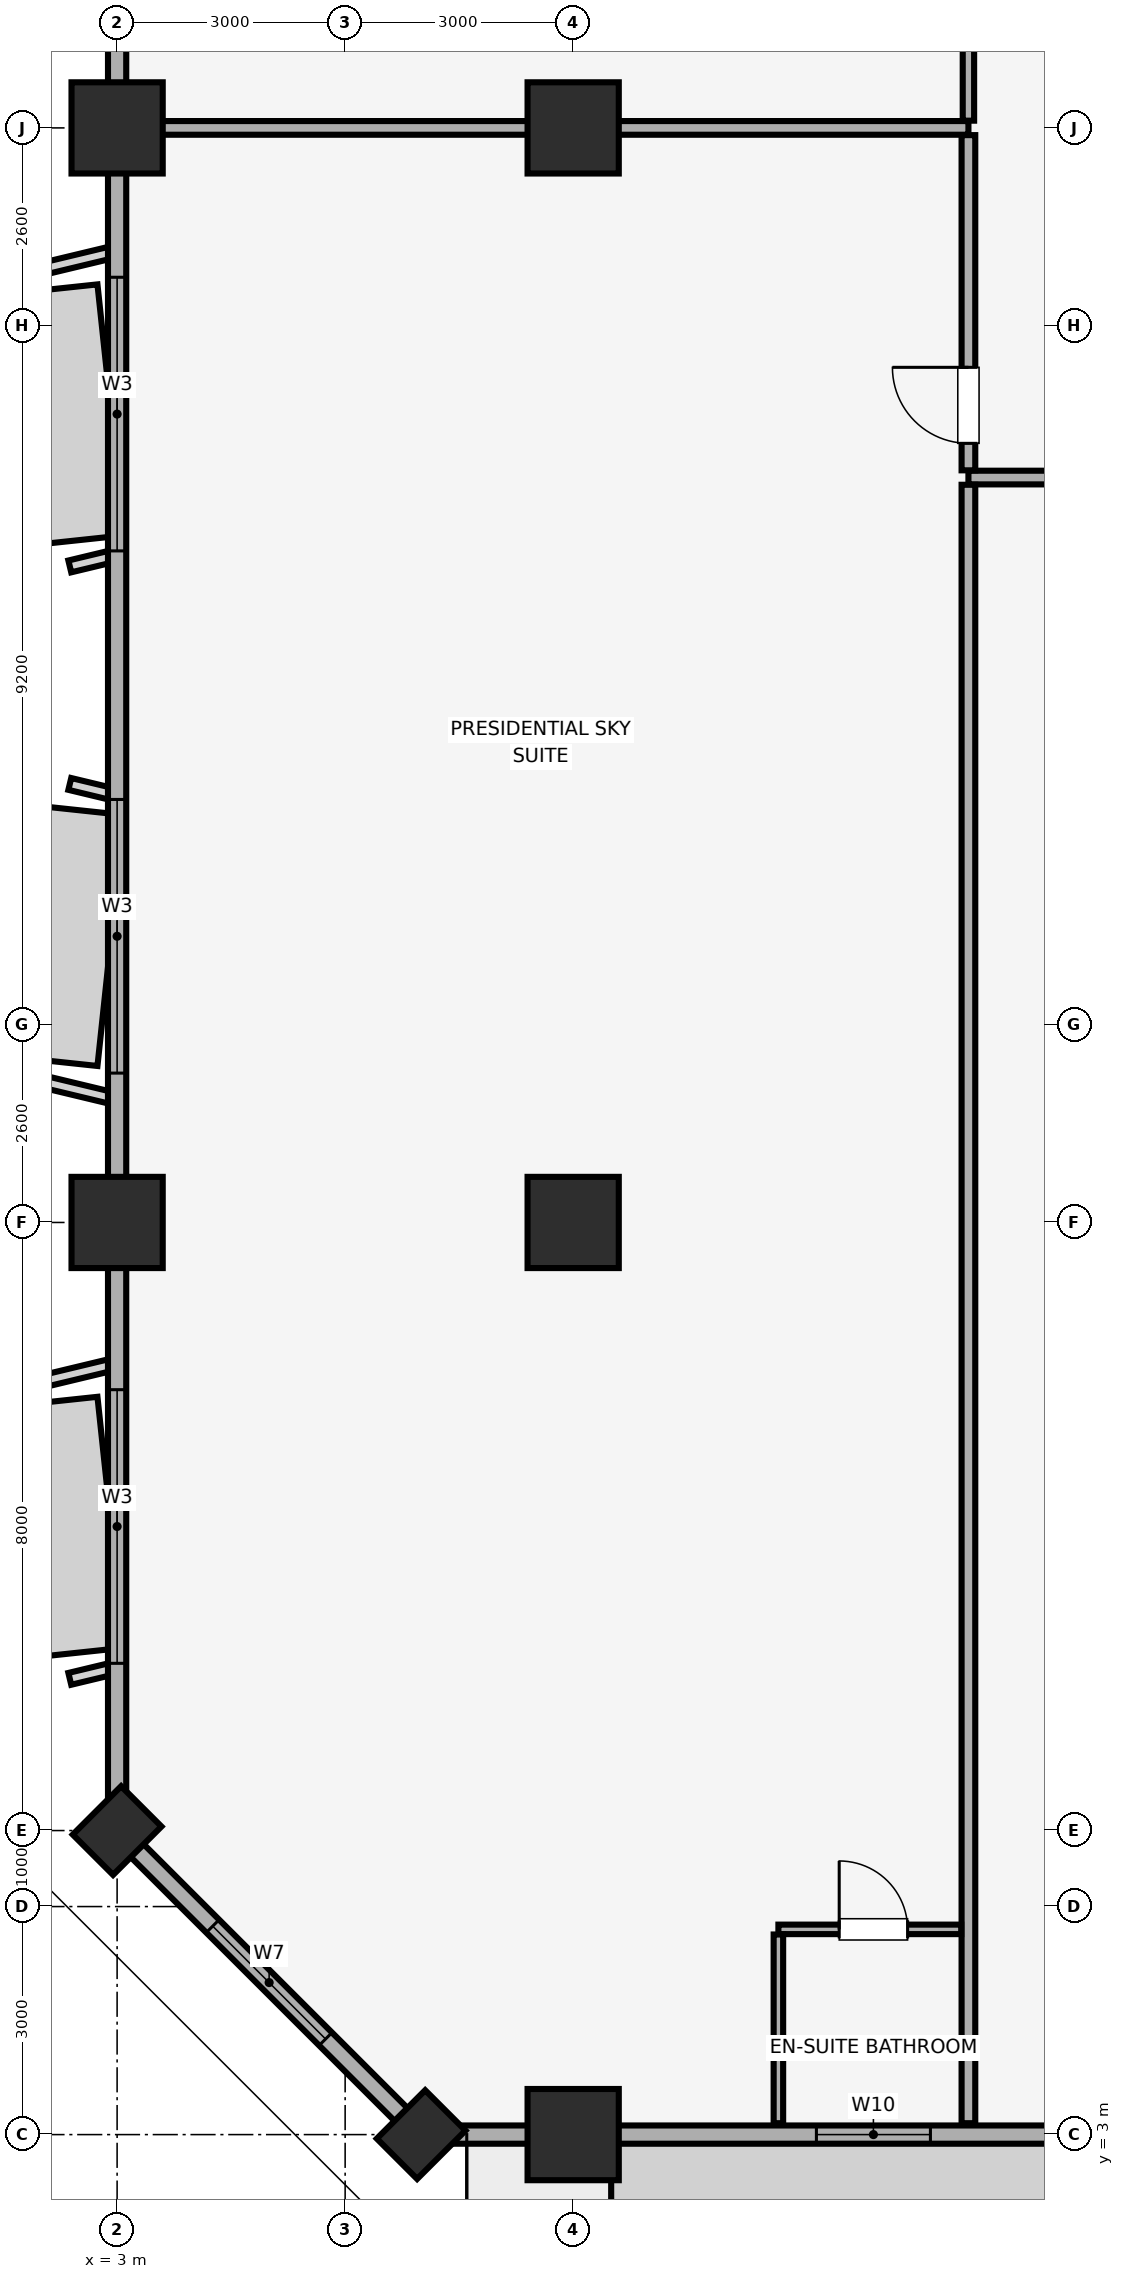
"""IFC4 building model, lengths in metres.
Left out: names, types, materials, properties, quantities, classifications, styles, units other than length and angle.
Written with IfcOpenShell. Run it as: python <this file> out.ifc"""

import sys

from ifc_helpers import new_model, si_unit, direction, frame, frame_2d, origin, origin_2d, place, context, subcontext, project, spatial, rectangle, extrude, element, fill, save


model = new_model("IFC4")
c1 = context("Model", 3, precision=1e-05, world=origin(), true_north=direction((0.0, 1.0)))
c2 = subcontext(c1, "Body", "Model", "MODEL_VIEW")
j1 = project(units=[si_unit("LENGTHUNIT", "METRE"), si_unit("PLANEANGLEUNIT", "RADIAN")], contexts=[c1])
p1 = place(None, origin())
s1 = spatial("IfcSite", under=j1, at=p1, CompositionType="ELEMENT")
p2 = place(p1, origin())
s2 = spatial("IfcBuilding", under=s1, at=p2, CompositionType="ELEMENT")
p3 = place(p2, frame((0.0, 0.0, 220.55)))
s3 = spatial("IfcBuildingStorey", under=s2, at=p3, CompositionType="ELEMENT", Elevation=220.55)
for number, where, z_axis, x_axis in (
    (1, (9.0, 3.0, 0.0), (0.0, 0.0, 1.0), (1.0, 0.0, 0.0)),
    (2, (3.0, 15.0, 0.0), (0.0, 0.0, 1.0), (1.0, 0.0, 0.0)),
    (3, (3.0, 29.4, 0.0), (0.0, 0.0, 1.0), (1.0, 0.0, 0.0)),
):
    element("IfcColumn", number, at=place(p3, frame(where, z_axis=z_axis, x_axis=x_axis)), inside=s3, PredefinedType="COLUMN", context=c2, shape_type="SweptSolid", body=[
        extrude(rectangle(XDim=1.2, YDim=1.2, at=origin_2d()), origin(), (0.0, 0.0, 1.0), 3.56),
    ])
for number, where, z_axis, x_axis in (
    (4, (7.0, 3.0, 0.0), (0.0, 0.0, 1.0), (0.707, 0.707, 0.0)),
    (5, (3.0, 7.0, 0.0), (0.0, 0.0, 1.0), (0.707, 0.707, 0.0)),
):
    element("IfcColumn", number, at=place(p3, frame(where, z_axis=z_axis, x_axis=x_axis)), inside=s3, PredefinedType="PILASTER", context=c2, shape_type="SweptSolid", body=[
        extrude(rectangle(XDim=0.9, YDim=0.75, at=origin_2d()), origin(), (0.0, 0.0, 1.0), 3.56),
    ])
for number, where, z_axis, x_axis in (
    (6, (9.0, 15.0, 0.0), (0.0, 0.0, 1.0), (1.0, 0.0, 0.0)),
    (7, (9.0, 29.4, 0.0), (0.0, 0.0, 1.0), (1.0, 0.0, 0.0)),
):
    element("IfcColumn", number, at=place(p3, frame(where, z_axis=z_axis, x_axis=x_axis)), inside=s3, PredefinedType="COLUMN", context=c2, shape_type="SweptSolid", body=[
        extrude(rectangle(XDim=1.2, YDim=1.2, at=origin_2d()), origin(), (0.0, 0.0, 1.0), 3.56),
    ])
p4 = place(p3, frame((7.0, 3.0, 0.0), z_axis=(0.0, 0.0, 1.0), x_axis=(1.0, 0.0, 0.0)))
e8 = element("IfcWall", 8, at=p4, inside=s3, PredefinedType="SOLIDWALL", context=c2, shape_type="SweptSolid", body=[
    extrude(rectangle(XDim=70.0, YDim=0.24, at=frame_2d((35.0, 0.0))), origin(), (0.0, 0.0, 1.0), 2.76),
])
p5 = place(p4, frame((17.86, 0.0, 0.0)))
e9 = element("IfcOpeningElement", 9, at=p5, cuts=e8, PredefinedType="OPENING", context=c2, shape_type="SweptSolid", body=[
    extrude(rectangle(XDim=1.1, YDim=2.15, at=frame_2d((0.55, 1.075))), frame((0.0, 0.13, 0.0), z_axis=(0.0, -1.0, 0.0), x_axis=(1.0, 0.0, 0.0)), (0.0, 0.0, 1.0), 0.26),
])
p6 = place(p4, frame((26.317, 0.0, 0.0)))
e10 = element("IfcOpeningElement", 10, at=p6, cuts=e8, PredefinedType="OPENING", context=c2, shape_type="SweptSolid", body=[
    extrude(rectangle(XDim=1.1, YDim=2.15, at=frame_2d((0.55, 1.075))), frame((0.0, 0.13, 0.0), z_axis=(0.0, -1.0, 0.0), x_axis=(1.0, 0.0, 0.0)), (0.0, 0.0, 1.0), 0.26),
])
p7 = place(p4, frame((57.517, 0.0, 0.0)))
e11 = element("IfcOpeningElement", 11, at=p7, cuts=e8, PredefinedType="OPENING", context=c2, shape_type="SweptSolid", body=[
    extrude(rectangle(XDim=1.1, YDim=2.15, at=frame_2d((0.55, 1.075))), frame((0.0, 0.13, 0.0), z_axis=(0.0, -1.0, 0.0), x_axis=(1.0, 0.0, 0.0)), (0.0, 0.0, 1.0), 0.26),
])
p8 = place(p4, frame((5.2, 0.0, 0.85)))
e12 = element("IfcOpeningElement", 12, at=p8, cuts=e8, PredefinedType="OPENING", context=c2, shape_type="SweptSolid", body=[
    extrude(rectangle(XDim=1.5, YDim=1.4, at=frame_2d((0.75, 0.7))), frame((0.0, 0.13, 0.0), z_axis=(0.0, -1.0, 0.0), x_axis=(1.0, 0.0, 0.0)), (0.0, 0.0, 1.0), 0.26),
])
p9 = place(p4, frame((10.7, 0.0, 0.85)))
e13 = element("IfcOpeningElement", 13, at=p9, cuts=e8, PredefinedType="OPENING", context=c2, shape_type="SweptSolid", body=[
    extrude(rectangle(XDim=4.2, YDim=1.65, at=frame_2d((2.1, 0.825))), frame((0.0, 0.13, 0.0), z_axis=(0.0, -1.0, 0.0), x_axis=(1.0, 0.0, 0.0)), (0.0, 0.0, 1.0), 0.26),
])
p10 = place(p4, frame((28.243, 0.0, 0.85)))
e14 = element("IfcOpeningElement", 14, at=p10, cuts=e8, PredefinedType="OPENING", context=c2, shape_type="SweptSolid", body=[
    extrude(rectangle(XDim=1.5, YDim=1.4, at=frame_2d((0.75, 0.7))), frame((0.0, 0.13, 0.0), z_axis=(0.0, -1.0, 0.0), x_axis=(1.0, 0.0, 0.0)), (0.0, 0.0, 1.0), 0.26),
])
p11 = place(p4, frame((31.9, 0.0, 0.85)))
e15 = element("IfcOpeningElement", 15, at=p11, cuts=e8, PredefinedType="OPENING", context=c2, shape_type="SweptSolid", body=[
    extrude(rectangle(XDim=2.4, YDim=1.5, at=frame_2d((1.2, 0.75))), frame((0.0, 0.13, 0.0), z_axis=(0.0, -1.0, 0.0), x_axis=(1.0, 0.0, 0.0)), (0.0, 0.0, 1.0), 0.26),
])
p12 = place(p4, frame((35.7, 0.0, 0.85)))
e16 = element("IfcOpeningElement", 16, at=p12, cuts=e8, PredefinedType="OPENING", context=c2, shape_type="SweptSolid", body=[
    extrude(rectangle(XDim=2.4, YDim=1.5, at=frame_2d((1.2, 0.75))), frame((0.0, 0.13, 0.0), z_axis=(0.0, -1.0, 0.0), x_axis=(1.0, 0.0, 0.0)), (0.0, 0.0, 1.0), 0.26),
])
p13 = place(p4, frame((40.7, 0.0, 0.85)))
e17 = element("IfcOpeningElement", 17, at=p13, cuts=e8, PredefinedType="OPENING", context=c2, shape_type="SweptSolid", body=[
    extrude(rectangle(XDim=4.2, YDim=1.65, at=frame_2d((2.1, 0.825))), frame((0.0, 0.13, 0.0), z_axis=(0.0, -1.0, 0.0), x_axis=(1.0, 0.0, 0.0)), (0.0, 0.0, 1.0), 0.26),
])
p14 = place(p4, frame((49.85, 0.0, 0.85)))
e18 = element("IfcOpeningElement", 18, at=p14, cuts=e8, PredefinedType="OPENING", context=c2, shape_type="SweptSolid", body=[
    extrude(rectangle(XDim=2.4, YDim=1.5, at=frame_2d((1.2, 0.75))), frame((0.0, 0.13, 0.0), z_axis=(0.0, -1.0, 0.0), x_axis=(1.0, 0.0, 0.0)), (0.0, 0.0, 1.0), 0.26),
])
p15 = place(p4, frame((54.473, 0.0, 0.85)))
e19 = element("IfcOpeningElement", 19, at=p15, cuts=e8, PredefinedType="OPENING", context=c2, shape_type="SweptSolid", body=[
    extrude(rectangle(XDim=2.4, YDim=1.5, at=frame_2d((1.2, 0.75))), frame((0.0, 0.13, 0.0), z_axis=(0.0, -1.0, 0.0), x_axis=(1.0, 0.0, 0.0)), (0.0, 0.0, 1.0), 0.26),
])
p16 = place(p4, frame((63.3, 0.0, 0.85)))
e20 = element("IfcOpeningElement", 20, at=p16, cuts=e8, PredefinedType="OPENING", context=c2, shape_type="SweptSolid", body=[
    extrude(rectangle(XDim=1.5, YDim=1.4, at=frame_2d((0.75, 0.7))), frame((0.0, 0.13, 0.0), z_axis=(0.0, -1.0, 0.0), x_axis=(1.0, 0.0, 0.0)), (0.0, 0.0, 1.0), 0.26),
])
p17 = place(p3, frame((3.0, 45.0, 0.0), z_axis=(0.0, 0.0, 1.0), x_axis=(0.0, -1.0, 0.0)))
e21 = element("IfcWall", 21, at=p17, inside=s3, PredefinedType="SOLIDWALL", context=c2, shape_type="SweptSolid", body=[
    extrude(rectangle(XDim=38.0, YDim=0.24, at=frame_2d((19.0, 0.0))), origin(), (0.0, 0.0, 1.0), 2.76),
])
p18 = place(p17, frame((32.2, 0.0, 0.85)))
e22 = element("IfcOpeningElement", 22, at=p18, cuts=e21, PredefinedType="OPENING", context=c2, shape_type="SweptSolid", body=[
    extrude(rectangle(XDim=3.6, YDim=1.65, at=frame_2d((1.8, 0.825))), frame((0.0, 0.13, 0.0), z_axis=(0.0, -1.0, 0.0), x_axis=(1.0, 0.0, 0.0)), (0.0, 0.0, 1.0), 0.26),
])
p19 = place(p17, frame((24.435, 0.0, 0.85)))
e23 = element("IfcOpeningElement", 23, at=p19, cuts=e21, PredefinedType="OPENING", context=c2, shape_type="SweptSolid", body=[
    extrude(rectangle(XDim=3.6, YDim=1.65, at=frame_2d((1.8, 0.825))), frame((0.0, 0.13, 0.0), z_axis=(0.0, -1.0, 0.0), x_axis=(1.0, 0.0, 0.0)), (0.0, 0.0, 1.0), 0.26),
])
p20 = place(p17, frame((17.565, 0.0, 0.85)))
e24 = element("IfcOpeningElement", 24, at=p20, cuts=e21, PredefinedType="OPENING", context=c2, shape_type="SweptSolid", body=[
    extrude(rectangle(XDim=3.6, YDim=1.65, at=frame_2d((1.8, 0.825))), frame((0.0, 0.13, 0.0), z_axis=(0.0, -1.0, 0.0), x_axis=(1.0, 0.0, 0.0)), (0.0, 0.0, 1.0), 0.26),
])
p21 = place(p17, frame((10.2, 0.0, 0.85)))
e25 = element("IfcOpeningElement", 25, at=p21, cuts=e21, PredefinedType="OPENING", context=c2, shape_type="SweptSolid", body=[
    extrude(rectangle(XDim=3.6, YDim=1.65, at=frame_2d((1.8, 0.825))), frame((0.0, 0.13, 0.0), z_axis=(0.0, -1.0, 0.0), x_axis=(1.0, 0.0, 0.0)), (0.0, 0.0, 1.0), 0.26),
])
p22 = place(p17, frame((6.55, 0.0, 0.85)))
e26 = element("IfcOpeningElement", 26, at=p22, cuts=e21, PredefinedType="OPENING", context=c2, shape_type="SweptSolid", body=[
    extrude(rectangle(XDim=1.5, YDim=1.4, at=frame_2d((0.75, 0.7))), frame((0.0, 0.13, 0.0), z_axis=(0.0, -1.0, 0.0), x_axis=(1.0, 0.0, 0.0)), (0.0, 0.0, 1.0), 0.26),
])
p23 = place(p17, frame((1.085, 0.0, 0.85)))
e27 = element("IfcOpeningElement", 27, at=p23, cuts=e21, PredefinedType="OPENING", context=c2, shape_type="SweptSolid", body=[
    extrude(rectangle(XDim=3.0, YDim=1.5, at=frame_2d((1.5, 0.75))), frame((0.0, 0.13, 0.0), z_axis=(0.0, -1.0, 0.0), x_axis=(1.0, 0.0, 0.0)), (0.0, 0.0, 1.0), 0.26),
])
p24 = place(p3, frame((3.0, 7.0, 0.0), z_axis=(0.0, 0.0, 1.0), x_axis=(0.707106781187, -0.707106781187, 0.0)))
e28 = element("IfcWall", 28, at=p24, inside=s3, PredefinedType="SOLIDWALL", context=c2, shape_type="SweptSolid", body=[
    extrude(rectangle(XDim=5.657, YDim=0.24, at=frame_2d((2.828, 0.0))), origin(), (0.0, 0.0, 1.0), 2.76),
])
p25 = place(p24, frame((1.778, 0.0, 0.85)))
e29 = element("IfcOpeningElement", 29, at=p25, cuts=e28, PredefinedType="OPENING", context=c2, shape_type="SweptSolid", body=[
    extrude(rectangle(XDim=2.1, YDim=1.6, at=frame_2d((1.05, 0.8))), frame((0.0, 0.13, 0.0), z_axis=(0.0, -1.0, 0.0), x_axis=(1.0, 0.0, 0.0)), (0.0, 0.0, 1.0), 0.26),
])
p26 = place(p3, frame((14.2, 24.8, 0.0), z_axis=(0.0, 0.0, 1.0), x_axis=(1.0, 0.0, 0.0)))
e30 = element("IfcWall", 30, at=p26, inside=s3, PredefinedType="PARTITIONING", context=c2, shape_type="SweptSolid", body=[
    extrude(rectangle(XDim=13.9, YDim=0.18, at=frame_2d((6.95, 0.0))), origin(), (0.0, 0.0, 1.0), 3.56),
])
p27 = place(p26, frame((5.1, 0.0, 0.0)))
e31 = element("IfcOpeningElement", 31, at=p27, cuts=e30, PredefinedType="OPENING", context=c2, shape_type="SweptSolid", body=[
    extrude(rectangle(XDim=1.0, YDim=2.15, at=frame_2d((0.5, 1.075))), frame((0.0, 0.1, 0.0), z_axis=(0.0, -1.0, 0.0), x_axis=(1.0, 0.0, 0.0)), (0.0, 0.0, 1.0), 0.2),
])
p28 = place(p3, frame((14.2, 3.15, 0.0), z_axis=(0.0, 0.0, 1.0), x_axis=(0.0, 1.0, 0.0)))
e32 = element("IfcWall", 32, at=p28, inside=s3, PredefinedType="PARTITIONING", context=c2, shape_type="SweptSolid", body=[
    extrude(rectangle(XDim=21.555, YDim=0.18, at=frame_2d((10.778, 0.0))), origin(), (0.0, 0.0, 1.0), 3.56),
])
p29 = place(p3, frame((3.15, 29.4, 0.0), z_axis=(0.0, 0.0, 1.0), x_axis=(1.0, 0.0, 0.0)))
e33 = element("IfcWall", 33, at=p29, inside=s3, PredefinedType="PARTITIONING", context=c2, shape_type="SweptSolid", body=[
    extrude(rectangle(XDim=11.05, YDim=0.18, at=frame_2d((5.525, 0.0))), origin(), (0.0, 0.0, 1.0), 2.719),
])
p30 = place(p3, frame((14.2, 24.895, 0.0), z_axis=(0.0, 0.0, 1.0), x_axis=(0.0, 1.0, 0.0)))
e34 = element("IfcWall", 34, at=p30, inside=s3, PredefinedType="PARTITIONING", context=c2, shape_type="SweptSolid", body=[
    extrude(rectangle(XDim=4.41, YDim=0.18, at=frame_2d((2.205, 0.0))), origin(), (0.0, 0.0, 1.0), 3.56),
])
p31 = place(p30, frame((0.355, 0.0, 0.0)))
e35 = element("IfcOpeningElement", 35, at=p31, cuts=e34, PredefinedType="OPENING", context=c2, shape_type="SweptSolid", body=[
    extrude(rectangle(XDim=1.0, YDim=2.15, at=frame_2d((0.5, 1.075))), frame((0.0, 0.1, 0.0), z_axis=(0.0, -1.0, 0.0), x_axis=(1.0, 0.0, 0.0)), (0.0, 0.0, 1.0), 0.2),
])
p32 = place(p3, frame((11.7, 5.7, 0.0), z_axis=(0.0, 0.0, 1.0), x_axis=(1.0, 0.0, 0.0)))
e36 = element("IfcWall", 36, at=p32, inside=s3, PredefinedType="PARTITIONING", context=c2, shape_type="SweptSolid", body=[
    extrude(rectangle(XDim=2.405, YDim=0.125, at=frame_2d((1.203, 0.0))), origin(), (0.0, 0.0, 1.0), 3.56),
])
p33 = place(p32, frame((0.8, 0.0, 0.0)))
e37 = element("IfcOpeningElement", 37, at=p33, cuts=e36, PredefinedType="OPENING", context=c2, shape_type="SweptSolid", body=[
    extrude(rectangle(XDim=0.9, YDim=2.1, at=frame_2d((0.45, 1.05))), frame((0.0, 0.073, 0.0), z_axis=(0.0, -1.0, 0.0), x_axis=(1.0, 0.0, 0.0)), (0.0, 0.0, 1.0), 0.145),
])
p34 = place(p3, frame((11.7, 3.15, 0.0), z_axis=(0.0, 0.0, 1.0), x_axis=(0.0, 1.0, 0.0)))
e38 = element("IfcWall", 38, at=p34, inside=s3, PredefinedType="PARTITIONING", context=c2, shape_type="SweptSolid", body=[
    extrude(rectangle(XDim=2.483, YDim=0.125, at=frame_2d((1.241, 0.0))), origin(), (0.0, 0.0, 1.0), 3.56),
])
p35 = place(p3, frame((14.2, 29.495, 0.0), z_axis=(0.0, 0.0, 1.0), x_axis=(0.0, 1.0, 0.0)))
e39 = element("IfcWall", 39, at=p35, inside=s3, PredefinedType="PARTITIONING", context=c2, shape_type="SweptSolid", body=[
    extrude(rectangle(XDim=6.625, YDim=0.15, at=frame_2d((3.312, 0.0))), origin(), (0.0, 0.0, 1.0), 3.56),
])
p36 = place(p35, frame((2.805, 0.0, 0.0)))
e40 = element("IfcOpeningElement", 40, at=p36, cuts=e39, PredefinedType="OPENING", context=c2, shape_type="SweptSolid", body=[
    extrude(rectangle(XDim=1.0, YDim=2.15, at=frame_2d((0.5, 1.075))), frame((0.0, 0.085, 0.0), z_axis=(0.0, -1.0, 0.0), x_axis=(1.0, 0.0, 0.0)), (0.0, 0.0, 1.0), 0.17),
])
p37 = place(p25, origin())
e41 = element("IfcWindow", 41, at=p37, inside=s3, PartitioningType="SINGLE_PANEL", PredefinedType="WINDOW", context=c2, shape_type="SweptSolid", body=[
    extrude(rectangle(XDim=2.1, YDim=1.6, at=frame_2d((1.05, 0.8))), frame((0.0, 0.03, 0.0), z_axis=(0.0, -1.0, 0.0), x_axis=(1.0, 0.0, 0.0)), (0.0, 0.0, 1.0), 0.06),
])
fill(e29, e41)
p38 = place(p8, origin())
e42 = element("IfcWindow", 42, at=p38, inside=s3, PartitioningType="SINGLE_PANEL", PredefinedType="WINDOW", context=c2, shape_type="SweptSolid", body=[
    extrude(rectangle(XDim=1.5, YDim=1.4, at=frame_2d((0.75, 0.7))), frame((0.0, 0.03, 0.0), z_axis=(0.0, -1.0, 0.0), x_axis=(1.0, 0.0, 0.0)), (0.0, 0.0, 1.0), 0.06),
])
fill(e12, e42)
p39 = place(p18, origin())
e43 = element("IfcWindow", 43, at=p39, inside=s3, PartitioningType="SINGLE_PANEL", PredefinedType="WINDOW", context=c2, shape_type="SweptSolid", body=[
    extrude(rectangle(XDim=3.6, YDim=1.65, at=frame_2d((1.8, 0.825))), frame((0.0, 0.03, 0.0), z_axis=(0.0, -1.0, 0.0), x_axis=(1.0, 0.0, 0.0)), (0.0, 0.0, 1.0), 0.06),
])
fill(e22, e43)
p40 = place(p19, origin())
e44 = element("IfcWindow", 44, at=p40, inside=s3, PartitioningType="SINGLE_PANEL", PredefinedType="WINDOW", context=c2, shape_type="SweptSolid", body=[
    extrude(rectangle(XDim=3.6, YDim=1.65, at=frame_2d((1.8, 0.825))), frame((0.0, 0.03, 0.0), z_axis=(0.0, -1.0, 0.0), x_axis=(1.0, 0.0, 0.0)), (0.0, 0.0, 1.0), 0.06),
])
fill(e23, e44)
p41 = place(p20, origin())
e45 = element("IfcWindow", 45, at=p41, inside=s3, PartitioningType="SINGLE_PANEL", PredefinedType="WINDOW", context=c2, shape_type="SweptSolid", body=[
    extrude(rectangle(XDim=3.6, YDim=1.65, at=frame_2d((1.8, 0.825))), frame((0.0, 0.03, 0.0), z_axis=(0.0, -1.0, 0.0), x_axis=(1.0, 0.0, 0.0)), (0.0, 0.0, 1.0), 0.06),
])
fill(e24, e45)
p42 = place(p31, origin())
e46 = element("IfcDoor", 46, at=p42, inside=s3, OperationType="SINGLE_SWING_RIGHT", PredefinedType="DOOR", context=c2, shape_type="SweptSolid", body=[
    extrude(rectangle(XDim=1.0, YDim=2.15, at=frame_2d((0.5, 1.075))), frame((0.0, 0.025, 0.0), z_axis=(0.0, -1.0, 0.0), x_axis=(1.0, 0.0, 0.0)), (0.0, 0.0, 1.0), 0.05),
])
fill(e35, e46)
p43 = place(p33, origin())
e47 = element("IfcDoor", 47, at=p43, inside=s3, OperationType="SINGLE_SWING_LEFT", PredefinedType="DOOR", context=c2, shape_type="SweptSolid", body=[
    extrude(rectangle(XDim=0.9, YDim=2.1, at=frame_2d((0.45, 1.05))), frame((0.0, 0.025, 0.0), z_axis=(0.0, -1.0, 0.0), x_axis=(1.0, 0.0, 0.0)), (0.0, 0.0, 1.0), 0.05),
])
fill(e37, e47)
save(model, sys.argv[1])
